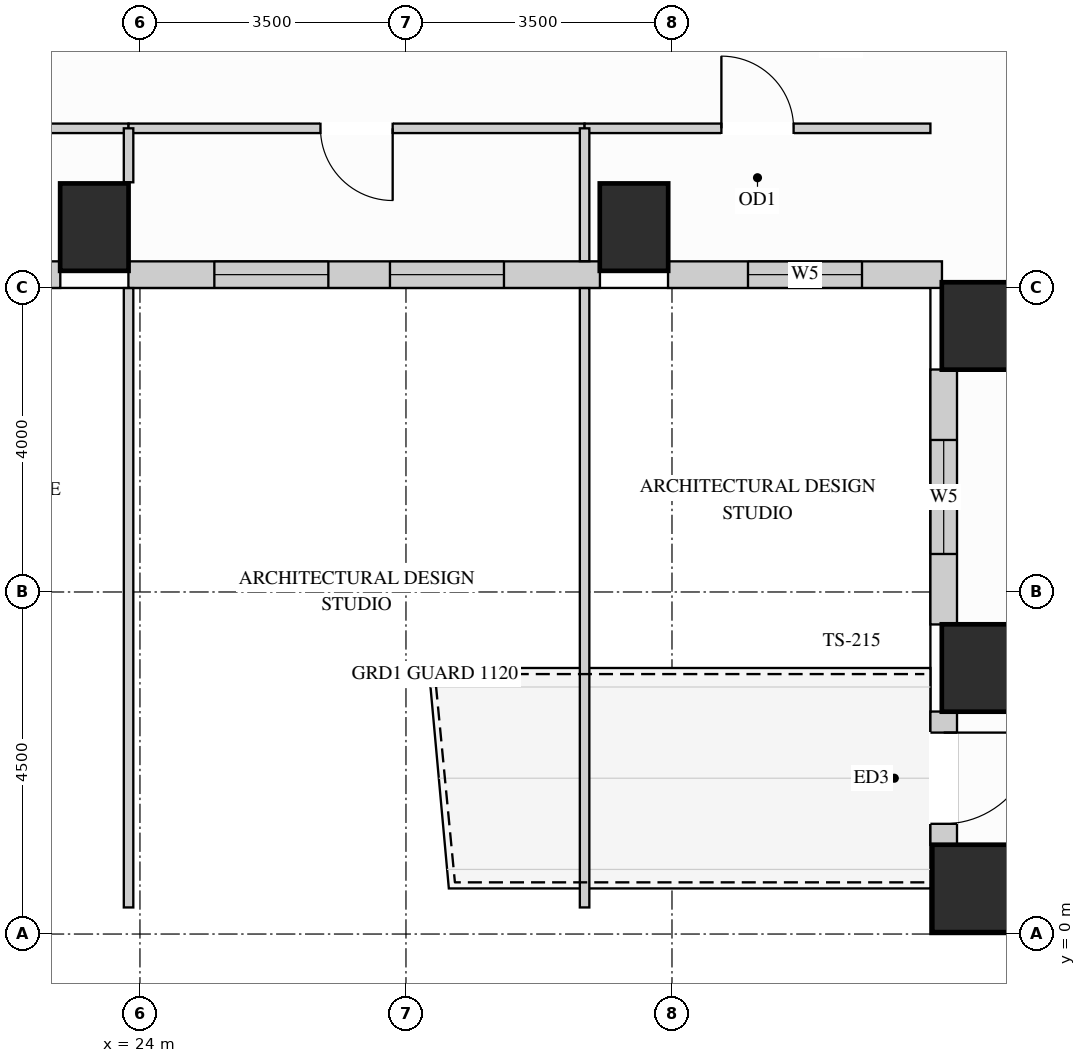
"""IFC4 building model, lengths in metres.
Left out: names, types, materials, properties, quantities, classifications, styles, units other than length and angle.
Written with IfcOpenShell. Run it as: python <this file> out.ifc"""

import sys

from ifc_helpers import new_model, si_unit, direction, frame, frame_2d, origin, origin_2d, place, context, subcontext, project, spatial, rectangle, extrude, source, transform, mapped, element, fill, save


model = new_model("IFC4")
c1 = context("Model", 3, precision=1e-05, world=origin(), true_north=direction((0.0, 1.0)))
c2 = subcontext(c1, "Body", "Model", "MODEL_VIEW")
j1 = project(units=[si_unit("LENGTHUNIT", "METRE"), si_unit("PLANEANGLEUNIT", "RADIAN")], contexts=[c1])
p1 = place(None, origin())
s1 = spatial("IfcSite", under=j1, at=p1, CompositionType="ELEMENT")
p2 = place(p1, origin())
s2 = spatial("IfcBuilding", under=s1, at=p2, CompositionType="ELEMENT")
p3 = place(p2, frame((0.0, 0.0, 135.0)))
s3 = spatial("IfcBuildingStorey", under=s2, at=p3, CompositionType="ELEMENT", Elevation=135.0)
m1 = source(origin(), c2, "Body", "SweptSolid", [
    extrude(rectangle(XDim=0.9, YDim=1.15, at=origin_2d()), origin(), (0.0, 0.0, 1.0), 3.32),
])
for number, where, z_axis, x_axis in (
    (1, (35.0, 3.5, 0.0), (0.0, 0.0, 1.0), (1.0, 0.0, 0.0)),
    (2, (35.0, 8.0, 0.0), (0.0, 0.0, 1.0), (1.0, 0.0, 0.0)),
    (3, (23.4, 9.3, 0.0), (0.0, 0.0, 1.0), (1.0, 0.0, 0.0)),
    (4, (30.5, 9.3, 0.0), (0.0, 0.0, 1.0), (1.0, 0.0, 0.0)),
):
    element("IfcColumn", number, at=place(p3, frame(where, z_axis=z_axis, x_axis=x_axis)), inside=s3, PredefinedType="COLUMN", context=c2, shape_type="MappedRepresentation", body=[
        mapped(m1, transform((0.0, 0.0, 0.0), x_axis=(1.0, 0.0, 0.0), y_axis=(0.0, 1.0, 0.0), z_axis=(0.0, 0.0, 1.0))),
    ])
m2 = source(origin(), c2, "Body", "SweptSolid", [
    extrude(rectangle(XDim=1.15, YDim=1.15, at=origin_2d()), origin(), (0.0, 0.0, 1.0), 3.32),
])
p4 = place(p3, frame((35.0, 0.6, 0.0), z_axis=(0.0, 0.0, 1.0), x_axis=(1.0, 0.0, 0.0)))
e5 = element("IfcColumn", 5, at=p4, inside=s3, PredefinedType="COLUMN", context=c2, shape_type="MappedRepresentation", body=[
    mapped(m2, transform((0.0, 0.0, 0.0), x_axis=(1.0, 0.0, 0.0), y_axis=(0.0, 1.0, 0.0), z_axis=(0.0, 0.0, 1.0))),
])
p5 = place(p3, frame((19.448, 8.675, 0.0), z_axis=(0.0, 0.0, 1.0), x_axis=(1.0, 0.0, 0.0)))
e6 = element("IfcWall", 6, at=p5, inside=s3, PredefinedType="SOLIDWALL", context=c2, shape_type="SweptSolid", body=[
    extrude(rectangle(XDim=3.504, YDim=0.35, at=frame_2d((1.752, 0.0))), origin(), (0.0, 0.0, 1.0), 3.305),
])
p6 = place(p5, frame((1.002, 0.0, 0.78)))
e7 = element("IfcOpeningElement", 7, at=p6, cuts=e6, PredefinedType="OPENING", context=c2, shape_type="SweptSolid", body=[
    extrude(rectangle(XDim=1.5, YDim=2.0, at=frame_2d((0.75, 1.0))), frame((0.0, 0.185, 0.0), z_axis=(0.0, -1.0, 0.0), x_axis=(1.0, 0.0, 0.0)), (0.0, 0.0, 1.0), 0.37),
])
p7 = place(p3, frame((23.848, 8.675, 0.0), z_axis=(0.0, 0.0, 1.0), x_axis=(1.0, 0.0, 0.0)))
e8 = element("IfcWall", 8, at=p7, inside=s3, PredefinedType="SOLIDWALL", context=c2, shape_type="SweptSolid", body=[
    extrude(rectangle(XDim=6.204, YDim=0.35, at=frame_2d((3.102, 0.0))), origin(), (0.0, 0.0, 1.0), 3.305),
])
p8 = place(p7, frame((1.131, 0.0, 0.78)))
e9 = element("IfcOpeningElement", 9, at=p8, cuts=e8, PredefinedType="OPENING", context=c2, shape_type="SweptSolid", body=[
    extrude(rectangle(XDim=1.5, YDim=2.0, at=frame_2d((0.75, 1.0))), frame((0.0, 0.185, 0.0), z_axis=(0.0, -1.0, 0.0), x_axis=(1.0, 0.0, 0.0)), (0.0, 0.0, 1.0), 0.37),
])
p9 = place(p7, frame((3.441, 0.0, 0.78)))
e10 = element("IfcOpeningElement", 10, at=p9, cuts=e8, PredefinedType="OPENING", context=c2, shape_type="SweptSolid", body=[
    extrude(rectangle(XDim=1.5, YDim=2.0, at=frame_2d((0.75, 1.0))), frame((0.0, 0.185, 0.0), z_axis=(0.0, -1.0, 0.0), x_axis=(1.0, 0.0, 0.0)), (0.0, 0.0, 1.0), 0.37),
])
p10 = place(p3, frame((30.948, 8.675, 0.0), z_axis=(0.0, 0.0, 1.0), x_axis=(1.0, 0.0, 0.0)))
e11 = element("IfcWall", 11, at=p10, inside=s3, PredefinedType="SOLIDWALL", context=c2, shape_type="SweptSolid", body=[
    extrude(rectangle(XDim=3.604, YDim=0.35, at=frame_2d((1.802, 0.0))), origin(), (0.0, 0.0, 1.0), 3.305),
])
p11 = place(p10, frame((1.052, 0.0, 0.78)))
e12 = element("IfcOpeningElement", 12, at=p11, cuts=e11, PredefinedType="OPENING", context=c2, shape_type="SweptSolid", body=[
    extrude(rectangle(XDim=1.5, YDim=2.0, at=frame_2d((0.75, 1.0))), frame((0.0, 0.185, 0.0), z_axis=(0.0, -1.0, 0.0), x_axis=(1.0, 0.0, 0.0)), (0.0, 0.0, 1.0), 0.37),
])
p12 = place(p3, frame((34.575, 7.427, 0.0), z_axis=(0.0, 0.0, 1.0), x_axis=(0.0, -1.0, 0.0)))
e13 = element("IfcWall", 13, at=p12, inside=s3, PredefinedType="SOLIDWALL", context=c2, shape_type="SweptSolid", body=[
    extrude(rectangle(XDim=3.354, YDim=0.35, at=frame_2d((1.677, 0.0))), origin(), (0.0, 0.0, 1.0), 3.305),
])
p13 = place(p12, frame((0.927, 0.0, 0.78)))
e14 = element("IfcOpeningElement", 14, at=p13, cuts=e13, PredefinedType="OPENING", context=c2, shape_type="SweptSolid", body=[
    extrude(rectangle(XDim=1.5, YDim=2.0, at=frame_2d((0.75, 1.0))), frame((0.0, 0.185, 0.0), z_axis=(0.0, -1.0, 0.0), x_axis=(1.0, 0.0, 0.0)), (0.0, 0.0, 1.0), 0.37),
])
p14 = place(p3, frame((34.575, 2.927, 0.0), z_axis=(0.0, 0.0, 1.0), x_axis=(0.0, -1.0, 0.0)))
e15 = element("IfcWall", 15, at=p14, inside=s3, PredefinedType="SOLIDWALL", context=c2, shape_type="SweptSolid", body=[
    extrude(rectangle(XDim=1.754, YDim=0.35, at=frame_2d((0.877, 0.0))), origin(), (0.0, 0.0, 1.0), 3.305),
])
p15 = place(p14, frame((0.277, 0.0, 0.0)))
e16 = element("IfcOpeningElement", 16, at=p15, cuts=e15, PredefinedType="OPENING", context=c2, shape_type="SweptSolid", body=[
    extrude(rectangle(XDim=1.2, YDim=2.15, at=frame_2d((0.6, 1.075))), frame((0.0, 0.185, 0.0), z_axis=(0.0, -1.0, 0.0), x_axis=(1.0, 0.0, 0.0)), (0.0, 0.0, 1.0), 0.37),
])
p16 = place(p3, frame((19.5, 10.6, 0.0), z_axis=(0.0, 0.0, 1.0), x_axis=(1.0, 0.0, 0.0)))
e17 = element("IfcWall", 17, at=p16, inside=s3, PredefinedType="PARTITIONING", context=c2, shape_type="SweptSolid", body=[
    extrude(rectangle(XDim=4.35, YDim=0.125, at=frame_2d((2.175, 0.0))), origin(), (0.0, 0.0, 1.0), 3.305),
])
p17 = place(p16, frame((1.7, 0.0, 0.0)))
e18 = element("IfcOpeningElement", 18, at=p17, cuts=e17, PredefinedType="OPENING", context=c2, shape_type="SweptSolid", body=[
    extrude(rectangle(XDim=0.95, YDim=2.15, at=frame_2d((0.475, 1.075))), frame((0.0, 0.073, 0.0), z_axis=(0.0, -1.0, 0.0), x_axis=(1.0, 0.0, 0.0)), (0.0, 0.0, 1.0), 0.145),
])
p18 = place(p3, frame((23.85, 10.6, 0.0), z_axis=(0.0, 0.0, 1.0), x_axis=(1.0, 0.0, 0.0)))
e19 = element("IfcWall", 19, at=p18, inside=s3, PredefinedType="PARTITIONING", context=c2, shape_type="SweptSolid", body=[
    extrude(rectangle(XDim=6.0, YDim=0.125, at=frame_2d((3.0, 0.0))), origin(), (0.0, 0.0, 1.0), 3.305),
])
p19 = place(p18, frame((2.525, 0.0, 0.0)))
e20 = element("IfcOpeningElement", 20, at=p19, cuts=e19, PredefinedType="OPENING", context=c2, shape_type="SweptSolid", body=[
    extrude(rectangle(XDim=0.95, YDim=2.15, at=frame_2d((0.475, 1.075))), frame((0.0, 0.073, 0.0), z_axis=(0.0, -1.0, 0.0), x_axis=(1.0, 0.0, 0.0)), (0.0, 0.0, 1.0), 0.145),
])
p20 = place(p3, frame((29.85, 10.6, 0.0), z_axis=(0.0, 0.0, 1.0), x_axis=(1.0, 0.0, 0.0)))
e21 = element("IfcWall", 21, at=p20, inside=s3, PredefinedType="PARTITIONING", context=c2, shape_type="SweptSolid", body=[
    extrude(rectangle(XDim=4.55, YDim=0.125, at=frame_2d((2.275, 0.0))), origin(), (0.0, 0.0, 1.0), 3.305),
])
p21 = place(p20, frame((1.8, 0.0, 0.0)))
e22 = element("IfcOpeningElement", 22, at=p21, cuts=e21, PredefinedType="OPENING", context=c2, shape_type="SweptSolid", body=[
    extrude(rectangle(XDim=0.95, YDim=2.15, at=frame_2d((0.475, 1.075))), frame((0.0, 0.073, 0.0), z_axis=(0.0, -1.0, 0.0), x_axis=(1.0, 0.0, 0.0)), (0.0, 0.0, 1.0), 0.145),
])
m3 = source(origin(), c2, "Body", "SweptSolid", [
    extrude(rectangle(XDim=8.148, YDim=0.125, at=frame_2d((4.074, 0.0))), origin(), (0.0, 0.0, 1.0), 3.305),
])
p22 = place(p3, frame((23.85, 0.35, 0.0), z_axis=(0.0, 0.0, 1.0), x_axis=(0.0, 1.0, 0.0)))
e23 = element("IfcWall", 23, at=p22, inside=s3, PredefinedType="PARTITIONING", context=c2, shape_type="MappedRepresentation", body=[
    mapped(m3, transform((0.0, 0.0, 0.0), x_axis=(1.0, 0.0, 0.0), y_axis=(0.0, 1.0, 0.0), z_axis=(0.0, 0.0, 1.0))),
])
m4 = source(origin(), c2, "Body", "SweptSolid", [
    extrude(rectangle(XDim=0.71, YDim=0.125, at=frame_2d((0.355, 0.0))), origin(), (0.0, 0.0, 1.0), 3.305),
])
p23 = place(p3, frame((23.85, 9.89, 0.0), z_axis=(0.0, 0.0, 1.0), x_axis=(0.0, 1.0, 0.0)))
e24 = element("IfcWall", 24, at=p23, inside=s3, PredefinedType="PARTITIONING", context=c2, shape_type="MappedRepresentation", body=[
    mapped(m4, transform((0.0, 0.0, 0.0), x_axis=(1.0, 0.0, 0.0), y_axis=(0.0, 1.0, 0.0), z_axis=(0.0, 0.0, 1.0))),
])
p24 = place(p3, frame((29.85, 0.35, 0.0), z_axis=(0.0, 0.0, 1.0), x_axis=(0.0, 1.0, 0.0)))
e25 = element("IfcWall", 25, at=p24, inside=s3, PredefinedType="PARTITIONING", context=c2, shape_type="MappedRepresentation", body=[
    mapped(m3, transform((0.0, 0.0, 0.0), x_axis=(1.0, 0.0, 0.0), y_axis=(0.0, 1.0, 0.0), z_axis=(0.0, 0.0, 1.0))),
])
m5 = source(origin(), c2, "Body", "SweptSolid", [
    extrude(rectangle(XDim=1.748, YDim=0.125, at=frame_2d((0.874, 0.0))), origin(), (0.0, 0.0, 1.0), 3.305),
])
p25 = place(p3, frame((29.85, 8.852, 0.0), z_axis=(0.0, 0.0, 1.0), x_axis=(0.0, 1.0, 0.0)))
e26 = element("IfcWall", 26, at=p25, inside=s3, PredefinedType="PARTITIONING", context=c2, shape_type="MappedRepresentation", body=[
    mapped(m5, transform((0.0, 0.0, 0.0), x_axis=(1.0, 0.0, 0.0), y_axis=(0.0, 1.0, 0.0), z_axis=(0.0, 0.0, 1.0))),
])
m6 = source(origin(), c2, "Body", "SweptSolid", [
    extrude(rectangle(XDim=1.2, YDim=2.15, at=frame_2d((0.6, 1.075))), frame((0.0, 0.025, 0.0), z_axis=(0.0, -1.0, 0.0), x_axis=(1.0, 0.0, 0.0)), (0.0, 0.0, 1.0), 0.05),
])
p26 = place(p15, frame((1.2, 0.0, 0.0), z_axis=(0.0, 0.0, 1.0), x_axis=(-1.0, 0.0, 0.0)))
e27 = element("IfcDoor", 27, at=p26, inside=s3, OperationType="SINGLE_SWING_LEFT", PredefinedType="DOOR", context=c2, shape_type="MappedRepresentation", body=[
    mapped(m6, transform((0.0, 0.0, 0.0), x_axis=(1.0, 0.0, 0.0), y_axis=(0.0, 1.0, 0.0), z_axis=(0.0, 0.0, 1.0))),
])
fill(e16, e27)
m7 = source(origin(), c2, "Body", "SweptSolid", [
    extrude(rectangle(XDim=0.95, YDim=2.15, at=frame_2d((0.475, 1.075))), frame((0.0, 0.025, 0.0), z_axis=(0.0, -1.0, 0.0), x_axis=(1.0, 0.0, 0.0)), (0.0, 0.0, 1.0), 0.05),
])
p27 = place(p19, origin())
e28 = element("IfcDoor", 28, at=p27, inside=s3, OperationType="SINGLE_SWING_RIGHT", PredefinedType="DOOR", context=c2, shape_type="MappedRepresentation", body=[
    mapped(m7, transform((0.0, 0.0, 0.0), x_axis=(1.0, 0.0, 0.0), y_axis=(0.0, 1.0, 0.0), z_axis=(0.0, 0.0, 1.0))),
])
fill(e20, e28)
p28 = place(p21, origin())
e29 = element("IfcDoor", 29, at=p28, inside=s3, OperationType="SINGLE_SWING_LEFT", PredefinedType="DOOR", context=c2, shape_type="MappedRepresentation", body=[
    mapped(m7, transform((0.0, 0.0, 0.0), x_axis=(1.0, 0.0, 0.0), y_axis=(0.0, 1.0, 0.0), z_axis=(0.0, 0.0, 1.0))),
])
fill(e22, e29)
m8 = source(origin(), c2, "Body", "SweptSolid", [
    extrude(rectangle(XDim=1.5, YDim=2.0, at=frame_2d((0.75, 1.0))), frame((0.0, 0.03, 0.0), z_axis=(0.0, -1.0, 0.0), x_axis=(1.0, 0.0, 0.0)), (0.0, 0.0, 1.0), 0.06),
])
p29 = place(p8, origin())
e30 = element("IfcWindow", 30, at=p29, inside=s3, PartitioningType="SINGLE_PANEL", PredefinedType="WINDOW", context=c2, shape_type="MappedRepresentation", body=[
    mapped(m8, transform((0.0, 0.0, 0.0), x_axis=(1.0, 0.0, 0.0), y_axis=(0.0, 1.0, 0.0), z_axis=(0.0, 0.0, 1.0))),
])
fill(e9, e30)
p30 = place(p9, origin())
e31 = element("IfcWindow", 31, at=p30, inside=s3, PartitioningType="SINGLE_PANEL", PredefinedType="WINDOW", context=c2, shape_type="MappedRepresentation", body=[
    mapped(m8, transform((0.0, 0.0, 0.0), x_axis=(1.0, 0.0, 0.0), y_axis=(0.0, 1.0, 0.0), z_axis=(0.0, 0.0, 1.0))),
])
fill(e10, e31)
p31 = place(p11, origin())
e32 = element("IfcWindow", 32, at=p31, inside=s3, PartitioningType="SINGLE_PANEL", PredefinedType="WINDOW", context=c2, shape_type="MappedRepresentation", body=[
    mapped(m8, transform((0.0, 0.0, 0.0), x_axis=(1.0, 0.0, 0.0), y_axis=(0.0, 1.0, 0.0), z_axis=(0.0, 0.0, 1.0))),
])
fill(e12, e32)
p32 = place(p13, origin())
e33 = element("IfcWindow", 33, at=p32, inside=s3, PartitioningType="SINGLE_PANEL", PredefinedType="WINDOW", context=c2, shape_type="MappedRepresentation", body=[
    mapped(m8, transform((0.0, 0.0, 0.0), x_axis=(1.0, 0.0, 0.0), y_axis=(0.0, 1.0, 0.0), z_axis=(0.0, 0.0, 1.0))),
])
fill(e14, e33)
save(model, sys.argv[1])
